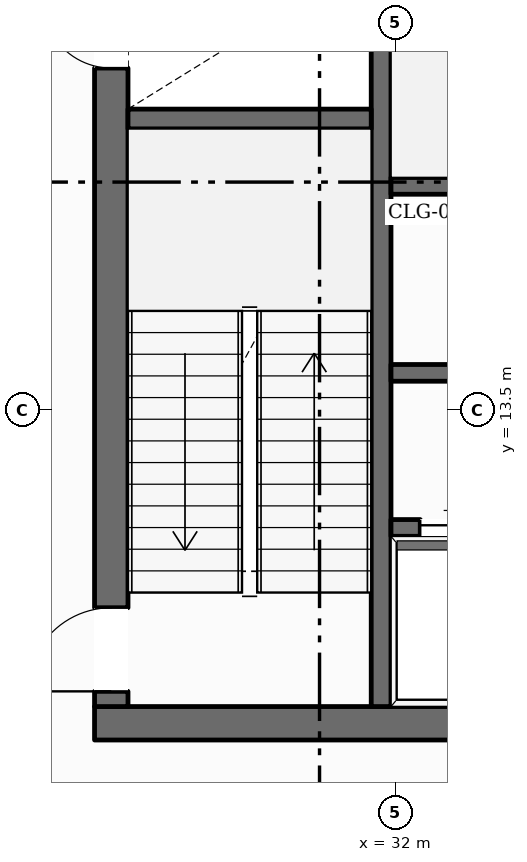
"""IFC4 building model, lengths in metres.
Left out: names, types, materials, properties, quantities, classifications, styles, units other than length and angle.
Written with IfcOpenShell. Run it as: python <this file> out.ifc"""

import sys

from ifc_helpers import new_model, si_unit, direction, frame, frame_2d, origin, place, context, subcontext, project, spatial, rectangle, extrude, element, fill, save


model = new_model("IFC4")
c1 = context("Model", 3, precision=1e-05, world=origin(), true_north=direction((0.0, 1.0)))
c2 = subcontext(c1, "Body", "Model", "MODEL_VIEW")
j1 = project(units=[si_unit("LENGTHUNIT", "METRE"), si_unit("PLANEANGLEUNIT", "RADIAN")], contexts=[c1])
p1 = place(None, origin())
s1 = spatial("IfcSite", under=j1, at=p1, CompositionType="ELEMENT")
p2 = place(p1, origin())
s2 = spatial("IfcBuilding", under=s1, at=p2, CompositionType="ELEMENT")
p3 = place(p2, frame((0.0, 0.0, 160.0)))
s3 = spatial("IfcBuildingStorey", under=s2, at=p3, CompositionType="ELEMENT", Elevation=160.0)
p4 = place(p3, frame((28.04, 9.38, 0.0), z_axis=(0.0, 0.0, 1.0), x_axis=(1.0, 0.0, 0.0)))
e1 = element("IfcWall", 1, at=p4, inside=s3, PredefinedType="SOLIDWALL", context=c2, shape_type="SweptSolid", body=[
    extrude(rectangle(XDim=19.92, YDim=0.44, at=frame_2d((9.96, 0.0))), origin(), (0.0, 0.0, 1.0), 4.75),
])
p5 = place(p4, frame((10.46, 0.0, 0.0)))
e2 = element("IfcOpeningElement", 2, at=p5, cuts=e1, PredefinedType="OPENING", context=c2, shape_type="SweptSolid", body=[
    extrude(rectangle(XDim=1.4, YDim=2.2, at=frame_2d((0.7, 1.1))), frame((0.0, 0.23, 0.0), z_axis=(0.0, -1.0, 0.0), x_axis=(1.0, 0.0, 0.0)), (0.0, 0.0, 1.0), 0.46),
])
p6 = place(p3, frame((28.26, 9.6, 0.0), z_axis=(0.0, 0.0, 1.0), x_axis=(0.0, 1.0, 0.0)))
e3 = element("IfcWall", 3, at=p6, inside=s3, PredefinedType="SOLIDWALL", context=c2, shape_type="SweptSolid", body=[
    extrude(rectangle(XDim=13.0, YDim=0.44, at=frame_2d((6.5, 0.0))), origin(), (0.0, 0.0, 1.0), 4.75),
])
p7 = place(p6, frame((0.2, 0.0, 0.0)))
e4 = element("IfcOpeningElement", 4, at=p7, cuts=e3, PredefinedType="OPENING", context=c2, shape_type="SweptSolid", body=[
    extrude(rectangle(XDim=1.1, YDim=2.15, at=frame_2d((0.55, 1.075))), frame((0.0, 0.23, 0.0), z_axis=(0.0, -1.0, 0.0), x_axis=(1.0, 0.0, 0.0)), (0.0, 0.0, 1.0), 0.46),
])
p8 = place(p6, frame((8.4, 0.0, 0.0)))
e5 = element("IfcOpeningElement", 5, at=p8, cuts=e3, PredefinedType="OPENING", context=c2, shape_type="SweptSolid", body=[
    extrude(rectangle(XDim=0.9, YDim=2.1, at=frame_2d((0.45, 1.05))), frame((0.0, 0.23, 0.0), z_axis=(0.0, -1.0, 0.0), x_axis=(1.0, 0.0, 0.0)), (0.0, 0.0, 1.0), 0.46),
])
p9 = place(p3, frame((31.81, 9.6, 0.0), z_axis=(0.0, 0.0, 1.0), x_axis=(0.0, 1.0, 0.0)))
e6 = element("IfcWall", 6, at=p9, inside=s3, PredefinedType="SHEAR", context=c2, shape_type="SweptSolid", body=[
    extrude(rectangle(XDim=13.0, YDim=0.26, at=frame_2d((6.5, 0.0))), origin(), (0.0, 0.0, 1.0), 4.75),
])
p10 = place(p9, frame((10.925, 0.0, 0.0)))
e7 = element("IfcOpeningElement", 7, at=p10, cuts=e6, PredefinedType="OPENING", context=c2, shape_type="SweptSolid", body=[
    extrude(rectangle(XDim=1.25, YDim=2.25, at=frame_2d((0.625, 1.125))), frame((0.0, 0.14, 0.0), z_axis=(0.0, -1.0, 0.0), x_axis=(1.0, 0.0, 0.0)), (0.0, 0.0, 1.0), 0.28),
])
p11 = place(p3, frame((28.48, 17.33, 0.0), z_axis=(0.0, 0.0, 1.0), x_axis=(1.0, 0.0, 0.0)))
e8 = element("IfcWall", 8, at=p11, inside=s3, PredefinedType="SHEAR", context=c2, shape_type="SweptSolid", body=[
    extrude(rectangle(XDim=3.2, YDim=0.26, at=frame_2d((1.6, 0.0))), origin(), (0.0, 0.0, 1.0), 4.75),
])
p12 = place(p3, frame((31.94, 16.45, 0.0), z_axis=(0.0, 0.0, 1.0), x_axis=(1.0, 0.0, 0.0)))
e9 = element("IfcWall", 9, at=p12, inside=s3, PredefinedType="SOLIDWALL", context=c2, shape_type="SweptSolid", body=[
    extrude(rectangle(XDim=12.12, YDim=0.22, at=frame_2d((6.06, 0.0))), origin(), (0.0, 0.0, 1.0), 4.75),
])
p13 = place(p3, frame((31.94, 13.99, 0.0), z_axis=(0.0, 0.0, 1.0), x_axis=(1.0, 0.0, 0.0)))
e10 = element("IfcWall", 10, at=p13, inside=s3, PredefinedType="SOLIDWALL", context=c2, shape_type="SweptSolid", body=[
    extrude(rectangle(XDim=12.12, YDim=0.22, at=frame_2d((6.06, 0.0))), origin(), (0.0, 0.0, 1.0), 4.75),
])
p14 = place(p13, frame((2.51, 0.0, 0.0)))
e11 = element("IfcOpeningElement", 11, at=p14, cuts=e10, PredefinedType="OPENING", context=c2, shape_type="SweptSolid", body=[
    extrude(rectangle(XDim=0.9, YDim=2.1, at=frame_2d((0.45, 1.05))), frame((0.0, 0.12, 0.0), z_axis=(0.0, -1.0, 0.0), x_axis=(1.0, 0.0, 0.0)), (0.0, 0.0, 1.0), 0.24),
])
p15 = place(p13, frame((6.535, 0.0, 0.0)))
e12 = element("IfcOpeningElement", 12, at=p15, cuts=e10, PredefinedType="OPENING", context=c2, shape_type="SweptSolid", body=[
    extrude(rectangle(XDim=1.1, YDim=2.2, at=frame_2d((0.55, 1.1))), frame((0.0, 0.12, 0.0), z_axis=(0.0, -1.0, 0.0), x_axis=(1.0, 0.0, 0.0)), (0.0, 0.0, 1.0), 0.24),
])
p16 = place(p13, frame((8.585, 0.0, 0.0)))
e13 = element("IfcOpeningElement", 13, at=p16, cuts=e10, PredefinedType="OPENING", context=c2, shape_type="SweptSolid", body=[
    extrude(rectangle(XDim=1.1, YDim=2.2, at=frame_2d((0.55, 1.1))), frame((0.0, 0.12, 0.0), z_axis=(0.0, -1.0, 0.0), x_axis=(1.0, 0.0, 0.0)), (0.0, 0.0, 1.0), 0.24),
])
p17 = place(p13, frame((10.635, 0.0, 0.0)))
e14 = element("IfcOpeningElement", 14, at=p17, cuts=e10, PredefinedType="OPENING", context=c2, shape_type="SweptSolid", body=[
    extrude(rectangle(XDim=1.1, YDim=2.2, at=frame_2d((0.55, 1.1))), frame((0.0, 0.12, 0.0), z_axis=(0.0, -1.0, 0.0), x_axis=(1.0, 0.0, 0.0)), (0.0, 0.0, 1.0), 0.24),
])
p18 = place(p3, frame((31.94, 11.95, 0.0), z_axis=(0.0, 0.0, 1.0), x_axis=(1.0, 0.0, 0.0)))
e15 = element("IfcWall", 15, at=p18, inside=s3, PredefinedType="SOLIDWALL", context=c2, shape_type="SweptSolid", body=[
    extrude(rectangle(XDim=6.19, YDim=0.22, at=frame_2d((3.095, 0.0))), origin(), (0.0, 0.0, 1.0), 4.75),
])
p19 = place(p18, frame((0.385, 0.0, 0.0)))
e16 = element("IfcOpeningElement", 16, at=p19, cuts=e15, PredefinedType="OPENING", context=c2, shape_type="SweptSolid", body=[
    extrude(rectangle(XDim=1.1, YDim=2.2, at=frame_2d((0.55, 1.1))), frame((0.0, 0.12, 0.0), z_axis=(0.0, -1.0, 0.0), x_axis=(1.0, 0.0, 0.0)), (0.0, 0.0, 1.0), 0.24),
])
p20 = place(p18, frame((2.435, 0.0, 0.0)))
e17 = element("IfcOpeningElement", 17, at=p20, cuts=e15, PredefinedType="OPENING", context=c2, shape_type="SweptSolid", body=[
    extrude(rectangle(XDim=1.1, YDim=2.2, at=frame_2d((0.55, 1.1))), frame((0.0, 0.12, 0.0), z_axis=(0.0, -1.0, 0.0), x_axis=(1.0, 0.0, 0.0)), (0.0, 0.0, 1.0), 0.24),
])
p21 = place(p18, frame((4.485, 0.0, 0.0)))
e18 = element("IfcOpeningElement", 18, at=p21, cuts=e15, PredefinedType="OPENING", context=c2, shape_type="SweptSolid", body=[
    extrude(rectangle(XDim=1.1, YDim=2.2, at=frame_2d((0.55, 1.1))), frame((0.0, 0.12, 0.0), z_axis=(0.0, -1.0, 0.0), x_axis=(1.0, 0.0, 0.0)), (0.0, 0.0, 1.0), 0.24),
])
p22 = place(p3, frame((14.827, 12.314, 0.0), z_axis=(0.0, 0.0, 1.0), x_axis=(0.495417756307, 0.868654849026, 0.0)))
e19 = element("IfcWall", 19, at=p22, inside=s3, PredefinedType="STANDARD", context=c2, shape_type="SweptSolid", body=[
    extrude(rectangle(XDim=37.012, YDim=0.35, at=frame_2d((18.506, 0.0))), origin(), (0.0, 0.0, 1.0), 4.282),
])
p23 = place(p22, frame((32.53, 0.0, 0.65)))
e20 = element("IfcOpeningElement", 20, at=p23, cuts=e19, PredefinedType="OPENING", context=c2, shape_type="SweptSolid", body=[
    extrude(rectangle(XDim=2.0, YDim=2.25, at=frame_2d((1.0, 1.125))), frame((0.0, 0.185, 0.0), z_axis=(0.0, -1.0, 0.0), x_axis=(1.0, 0.0, 0.0)), (0.0, 0.0, 1.0), 0.37),
])
p24 = place(p22, frame((2.478, 0.0, 0.65)))
e21 = element("IfcOpeningElement", 21, at=p24, cuts=e19, PredefinedType="OPENING", context=c2, shape_type="SweptSolid", body=[
    extrude(rectangle(XDim=2.0, YDim=2.25, at=frame_2d((1.0, 1.125))), frame((0.0, 0.185, 0.0), z_axis=(0.0, -1.0, 0.0), x_axis=(1.0, 0.0, 0.0)), (0.0, 0.0, 1.0), 0.37),
])
p25 = place(p7, origin())
e22 = element("IfcDoor", 22, at=p25, inside=s3, OperationType="SINGLE_SWING_LEFT", PredefinedType="DOOR", context=c2, shape_type="SweptSolid", body=[
    extrude(rectangle(XDim=1.1, YDim=2.15, at=frame_2d((0.55, 1.075))), frame((0.0, 0.025, 0.0), z_axis=(0.0, -1.0, 0.0), x_axis=(1.0, 0.0, 0.0)), (0.0, 0.0, 1.0), 0.05),
])
fill(e4, e22)
p26 = place(p8, origin())
e23 = element("IfcDoor", 23, at=p26, inside=s3, OperationType="SINGLE_SWING_RIGHT", PredefinedType="DOOR", context=c2, shape_type="SweptSolid", body=[
    extrude(rectangle(XDim=0.9, YDim=2.1, at=frame_2d((0.45, 1.05))), frame((0.0, 0.025, 0.0), z_axis=(0.0, -1.0, 0.0), x_axis=(1.0, 0.0, 0.0)), (0.0, 0.0, 1.0), 0.05),
])
fill(e5, e23)
p27 = place(p19, origin())
e24 = element("IfcDoor", 24, at=p27, inside=s3, OperationType="DOUBLE_DOOR_SLIDING", PredefinedType="DOOR", context=c2, shape_type="SweptSolid", body=[
    extrude(rectangle(XDim=1.1, YDim=2.2, at=frame_2d((0.55, 1.1))), frame((0.0, 0.025, 0.0), z_axis=(0.0, -1.0, 0.0), x_axis=(1.0, 0.0, 0.0)), (0.0, 0.0, 1.0), 0.05),
])
fill(e16, e24)
save(model, sys.argv[1])
